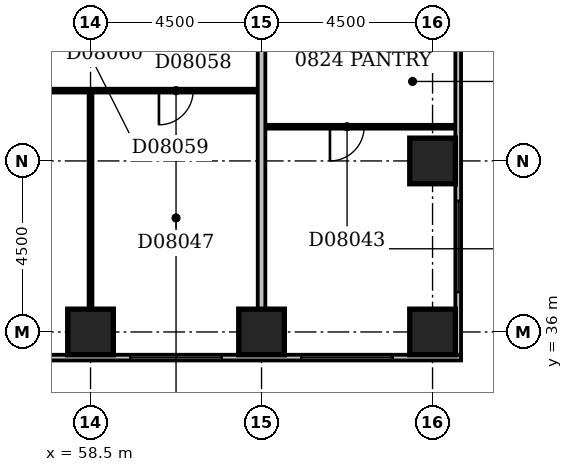
"""IFC4 building model, lengths in metres.
Left out: names, types, materials, properties, quantities, classifications, styles, units other than length and angle.
Written with IfcOpenShell. Run it as: python <this file> out.ifc"""

import sys

from ifc_helpers import new_model, si_unit, direction, frame, frame_2d, origin, origin_2d, place, context, subcontext, project, spatial, rectangle, extrude, element, fill, save


model = new_model("IFC4")
c1 = context("Model", 3, precision=1e-05, world=origin(), true_north=direction((0.0, 1.0)))
c2 = subcontext(c1, "Body", "Model", "MODEL_VIEW")
j1 = project(units=[si_unit("LENGTHUNIT", "METRE"), si_unit("PLANEANGLEUNIT", "RADIAN")], contexts=[c1])
p1 = place(None, origin())
s1 = spatial("IfcSite", under=j1, at=p1, CompositionType="ELEMENT")
p2 = place(p1, origin())
s2 = spatial("IfcBuilding", under=s1, at=p2, CompositionType="ELEMENT")
p3 = place(p2, frame((0.0, 0.0, 39.8)))
s3 = spatial("IfcBuildingStorey", under=s2, at=p3, CompositionType="ELEMENT", Elevation=39.8)
for number, where, z_axis, x_axis in (
    (1, (58.5, 36.0, -0.3), (0.0, 0.0, 1.0), (1.0, 0.0, 0.0)),
    (2, (63.0, 36.0, -0.3), (0.0, 0.0, 1.0), (1.0, 0.0, 0.0)),
    (3, (67.5, 36.0, -0.3), (0.0, 0.0, 1.0), (1.0, 0.0, 0.0)),
    (4, (67.5, 40.5, -0.3), (0.0, 0.0, 1.0), (1.0, 0.0, 0.0)),
):
    element("IfcColumn", number, at=place(p3, frame(where, z_axis=z_axis, x_axis=x_axis)), inside=s3, PredefinedType="COLUMN", context=c2, shape_type="SweptSolid", body=[
        extrude(rectangle(XDim=1.2, YDim=1.2, at=origin_2d()), origin(), (0.0, 0.0, 1.0), 3.6),
    ])
p4 = place(p3, frame((23.1, 35.325, 0.0), z_axis=(0.0, 0.0, 1.0), x_axis=(1.0, 0.0, 0.0)))
e5 = element("IfcWall", 5, at=p4, inside=s3, PredefinedType="STANDARD", context=c2, shape_type="SweptSolid", body=[
    extrude(rectangle(XDim=45.15, YDim=0.15, at=frame_2d((22.575, 0.0))), origin(), (0.0, 0.0, 1.0), 2.7),
])
p5 = place(p4, frame((0.45, 0.0, 0.6)))
e6 = element("IfcOpeningElement", 6, at=p5, cuts=e5, PredefinedType="OPENING", context=c2, shape_type="SweptSolid", body=[
    extrude(rectangle(XDim=2.4, YDim=1.8, at=frame_2d((1.2, 0.9))), frame((0.0, 0.087, 0.0), z_axis=(0.0, -1.0, 0.0), x_axis=(1.0, 0.0, 0.0)), (0.0, 0.0, 1.0), 0.174),
])
p6 = place(p4, frame((6.56, 0.0, 0.6)))
e7 = element("IfcOpeningElement", 7, at=p6, cuts=e5, PredefinedType="OPENING", context=c2, shape_type="SweptSolid", body=[
    extrude(rectangle(XDim=0.9, YDim=1.8, at=frame_2d((0.45, 0.9))), frame((0.0, 0.087, 0.0), z_axis=(0.0, -1.0, 0.0), x_axis=(1.0, 0.0, 0.0)), (0.0, 0.0, 1.0), 0.174),
])
p7 = place(p4, frame((9.45, 0.0, 0.6)))
e8 = element("IfcOpeningElement", 8, at=p7, cuts=e5, PredefinedType="OPENING", context=c2, shape_type="SweptSolid", body=[
    extrude(rectangle(XDim=2.4, YDim=1.8, at=frame_2d((1.2, 0.9))), frame((0.0, 0.087, 0.0), z_axis=(0.0, -1.0, 0.0), x_axis=(1.0, 0.0, 0.0)), (0.0, 0.0, 1.0), 0.174),
])
p8 = place(p4, frame((13.95, 0.0, 0.6)))
e9 = element("IfcOpeningElement", 9, at=p8, cuts=e5, PredefinedType="OPENING", context=c2, shape_type="SweptSolid", body=[
    extrude(rectangle(XDim=2.4, YDim=1.8, at=frame_2d((1.2, 0.9))), frame((0.0, 0.087, 0.0), z_axis=(0.0, -1.0, 0.0), x_axis=(1.0, 0.0, 0.0)), (0.0, 0.0, 1.0), 0.174),
])
p9 = place(p4, frame((18.33, 0.0, 0.6)))
e10 = element("IfcOpeningElement", 10, at=p9, cuts=e5, PredefinedType="OPENING", context=c2, shape_type="SweptSolid", body=[
    extrude(rectangle(XDim=1.5, YDim=1.8, at=frame_2d((0.75, 0.9))), frame((0.0, 0.087, 0.0), z_axis=(0.0, -1.0, 0.0), x_axis=(1.0, 0.0, 0.0)), (0.0, 0.0, 1.0), 0.174),
])
p10 = place(p4, frame((22.95, 0.0, 0.6)))
e11 = element("IfcOpeningElement", 11, at=p10, cuts=e5, PredefinedType="OPENING", context=c2, shape_type="SweptSolid", body=[
    extrude(rectangle(XDim=2.4, YDim=1.8, at=frame_2d((1.2, 0.9))), frame((0.0, 0.087, 0.0), z_axis=(0.0, -1.0, 0.0), x_axis=(1.0, 0.0, 0.0)), (0.0, 0.0, 1.0), 0.174),
])
p11 = place(p4, frame((27.45, 0.0, 0.6)))
e12 = element("IfcOpeningElement", 12, at=p11, cuts=e5, PredefinedType="OPENING", context=c2, shape_type="SweptSolid", body=[
    extrude(rectangle(XDim=2.4, YDim=1.8, at=frame_2d((1.2, 0.9))), frame((0.0, 0.087, 0.0), z_axis=(0.0, -1.0, 0.0), x_axis=(1.0, 0.0, 0.0)), (0.0, 0.0, 1.0), 0.174),
])
p12 = place(p4, frame((31.797, 0.0, 0.6)))
e13 = element("IfcOpeningElement", 13, at=p12, cuts=e5, PredefinedType="OPENING", context=c2, shape_type="SweptSolid", body=[
    extrude(rectangle(XDim=0.6, YDim=1.8, at=frame_2d((0.3, 0.9))), frame((0.0, 0.087, 0.0), z_axis=(0.0, -1.0, 0.0), x_axis=(1.0, 0.0, 0.0)), (0.0, 0.0, 1.0), 0.174),
])
p13 = place(p4, frame((36.45, 0.0, 0.6)))
e14 = element("IfcOpeningElement", 14, at=p13, cuts=e5, PredefinedType="OPENING", context=c2, shape_type="SweptSolid", body=[
    extrude(rectangle(XDim=2.4, YDim=1.8, at=frame_2d((1.2, 0.9))), frame((0.0, 0.087, 0.0), z_axis=(0.0, -1.0, 0.0), x_axis=(1.0, 0.0, 0.0)), (0.0, 0.0, 1.0), 0.174),
])
p14 = place(p4, frame((40.95, 0.0, 0.6)))
e15 = element("IfcOpeningElement", 15, at=p14, cuts=e5, PredefinedType="OPENING", context=c2, shape_type="SweptSolid", body=[
    extrude(rectangle(XDim=2.4, YDim=1.8, at=frame_2d((1.2, 0.9))), frame((0.0, 0.087, 0.0), z_axis=(0.0, -1.0, 0.0), x_axis=(1.0, 0.0, 0.0)), (0.0, 0.0, 1.0), 0.174),
])
p15 = place(p3, frame((68.175, 35.4, 0.0), z_axis=(0.0, 0.0, 1.0), x_axis=(0.0, 1.0, 0.0)))
e16 = element("IfcWall", 16, at=p15, inside=s3, PredefinedType="STANDARD", context=c2, shape_type="SweptSolid", body=[
    extrude(rectangle(XDim=23.85, YDim=0.15, at=frame_2d((11.925, 0.0))), origin(), (0.0, 0.0, 1.0), 2.7),
])
p16 = place(p15, frame((1.65, 0.0, 0.6)))
e17 = element("IfcOpeningElement", 17, at=p16, cuts=e16, PredefinedType="OPENING", context=c2, shape_type="SweptSolid", body=[
    extrude(rectangle(XDim=2.4, YDim=1.8, at=frame_2d((1.2, 0.9))), frame((0.0, 0.087, 0.0), z_axis=(0.0, -1.0, 0.0), x_axis=(1.0, 0.0, 0.0)), (0.0, 0.0, 1.0), 0.174),
])
p17 = place(p15, frame((20.355, 0.0, 0.6)))
e18 = element("IfcOpeningElement", 18, at=p17, cuts=e16, PredefinedType="OPENING", context=c2, shape_type="SweptSolid", body=[
    extrude(rectangle(XDim=1.8, YDim=1.8, at=frame_2d((0.9, 0.9))), frame((0.0, 0.087, 0.0), z_axis=(0.0, -1.0, 0.0), x_axis=(1.0, 0.0, 0.0)), (0.0, 0.0, 1.0), 0.174),
])
p18 = place(p3, frame((58.5, 36.6, 0.0), z_axis=(0.0, 0.0, 1.0), x_axis=(0.0, 1.0, 0.0)))
e19 = element("IfcWall", 19, at=p18, inside=s3, PredefinedType="PARTITIONING", context=c2, shape_type="SweptSolid", body=[
    extrude(rectangle(XDim=5.7, YDim=0.1, at=frame_2d((2.85, 0.0))), origin(), (0.0, 0.0, 1.0), 3.3),
])
p19 = place(p3, frame((63.0, 36.6, 0.0), z_axis=(0.0, 0.0, 1.0), x_axis=(0.0, 1.0, 0.0)))
e20 = element("IfcWall", 20, at=p19, inside=s3, PredefinedType="PARTITIONING", context=c2, shape_type="SweptSolid", body=[
    extrude(rectangle(XDim=12.8, YDim=0.2, at=frame_2d((6.4, 0.0))), origin(), (0.0, 0.0, 1.0), 2.4),
])
p20 = place(p3, frame((63.1, 41.4, 0.0), z_axis=(0.0, 0.0, 1.0), x_axis=(1.0, 0.0, 0.0)))
e21 = element("IfcWall", 21, at=p20, inside=s3, PredefinedType="PARTITIONING", context=c2, shape_type="SweptSolid", body=[
    extrude(rectangle(XDim=5.0, YDim=0.1, at=frame_2d((2.5, 0.0))), origin(), (0.0, 0.0, 1.0), 3.3),
])
p21 = place(p20, frame((1.7, 0.0, 0.0)))
e22 = element("IfcOpeningElement", 22, at=p21, cuts=e21, PredefinedType="OPENING", context=c2, shape_type="SweptSolid", body=[
    extrude(rectangle(XDim=0.9, YDim=2.1, at=frame_2d((0.45, 1.05))), frame((0.0, 0.062, 0.0), z_axis=(0.0, -1.0, 0.0), x_axis=(1.0, 0.0, 0.0)), (0.0, 0.0, 1.0), 0.124),
])
p22 = place(p3, frame((45.1, 42.35, 0.0), z_axis=(0.0, 0.0, 1.0), x_axis=(1.0, 0.0, 0.0)))
e23 = element("IfcWall", 23, at=p22, inside=s3, PredefinedType="PARTITIONING", context=c2, shape_type="SweptSolid", body=[
    extrude(rectangle(XDim=17.8, YDim=0.1, at=frame_2d((8.9, 0.0))), origin(), (0.0, 0.0, 1.0), 3.3),
])
p23 = place(p22, frame((1.7, 0.0, 0.0)))
e24 = element("IfcOpeningElement", 24, at=p23, cuts=e23, PredefinedType="OPENING", context=c2, shape_type="SweptSolid", body=[
    extrude(rectangle(XDim=0.9, YDim=2.1, at=frame_2d((0.45, 1.05))), frame((0.0, 0.062, 0.0), z_axis=(0.0, -1.0, 0.0), x_axis=(1.0, 0.0, 0.0)), (0.0, 0.0, 1.0), 0.124),
])
p24 = place(p22, frame((6.2, 0.0, 0.0)))
e25 = element("IfcOpeningElement", 25, at=p24, cuts=e23, PredefinedType="OPENING", context=c2, shape_type="SweptSolid", body=[
    extrude(rectangle(XDim=0.9, YDim=2.1, at=frame_2d((0.45, 1.05))), frame((0.0, 0.062, 0.0), z_axis=(0.0, -1.0, 0.0), x_axis=(1.0, 0.0, 0.0)), (0.0, 0.0, 1.0), 0.124),
])
p25 = place(p22, frame((10.7, 0.0, 0.0)))
e26 = element("IfcOpeningElement", 26, at=p25, cuts=e23, PredefinedType="OPENING", context=c2, shape_type="SweptSolid", body=[
    extrude(rectangle(XDim=0.9, YDim=2.1, at=frame_2d((0.45, 1.05))), frame((0.0, 0.062, 0.0), z_axis=(0.0, -1.0, 0.0), x_axis=(1.0, 0.0, 0.0)), (0.0, 0.0, 1.0), 0.124),
])
p26 = place(p22, frame((15.2, 0.0, 0.0)))
e27 = element("IfcOpeningElement", 27, at=p26, cuts=e23, PredefinedType="OPENING", context=c2, shape_type="SweptSolid", body=[
    extrude(rectangle(XDim=0.9, YDim=2.1, at=frame_2d((0.45, 1.05))), frame((0.0, 0.062, 0.0), z_axis=(0.0, -1.0, 0.0), x_axis=(1.0, 0.0, 0.0)), (0.0, 0.0, 1.0), 0.124),
])
p27 = place(p13, origin())
e28 = element("IfcWindow", 28, at=p27, inside=s3, PartitioningType="SINGLE_PANEL", PredefinedType="WINDOW", context=c2, shape_type="SweptSolid", body=[
    extrude(rectangle(XDim=2.4, YDim=1.8, at=frame_2d((1.2, 0.9))), frame((0.0, 0.03, 0.0), z_axis=(0.0, -1.0, 0.0), x_axis=(1.0, 0.0, 0.0)), (0.0, 0.0, 1.0), 0.06),
])
fill(e14, e28)
p28 = place(p14, origin())
e29 = element("IfcWindow", 29, at=p28, inside=s3, PartitioningType="SINGLE_PANEL", PredefinedType="WINDOW", context=c2, shape_type="SweptSolid", body=[
    extrude(rectangle(XDim=2.4, YDim=1.8, at=frame_2d((1.2, 0.9))), frame((0.0, 0.03, 0.0), z_axis=(0.0, -1.0, 0.0), x_axis=(1.0, 0.0, 0.0)), (0.0, 0.0, 1.0), 0.06),
])
fill(e15, e29)
p29 = place(p16, origin())
e30 = element("IfcWindow", 30, at=p29, inside=s3, PartitioningType="SINGLE_PANEL", PredefinedType="WINDOW", context=c2, shape_type="SweptSolid", body=[
    extrude(rectangle(XDim=2.4, YDim=1.8, at=frame_2d((1.2, 0.9))), frame((0.0, 0.03, 0.0), z_axis=(0.0, -1.0, 0.0), x_axis=(1.0, 0.0, 0.0)), (0.0, 0.0, 1.0), 0.06),
])
fill(e17, e30)
p30 = place(p21, frame((0.9, 0.0, 0.0), z_axis=(0.0, 0.0, 1.0), x_axis=(-1.0, 0.0, 0.0)))
e31 = element("IfcDoor", 31, at=p30, inside=s3, OperationType="SINGLE_SWING_RIGHT", PredefinedType="DOOR", context=c2, shape_type="SweptSolid", body=[
    extrude(rectangle(XDim=0.9, YDim=2.1, at=frame_2d((0.45, 1.05))), frame((0.0, 0.025, 0.0), z_axis=(0.0, -1.0, 0.0), x_axis=(1.0, 0.0, 0.0)), (0.0, 0.0, 1.0), 0.05),
])
fill(e22, e31)
p31 = place(p26, frame((0.9, 0.0, 0.0), z_axis=(0.0, 0.0, 1.0), x_axis=(-1.0, 0.0, 0.0)))
e32 = element("IfcDoor", 32, at=p31, inside=s3, OperationType="SINGLE_SWING_RIGHT", PredefinedType="DOOR", context=c2, shape_type="SweptSolid", body=[
    extrude(rectangle(XDim=0.9, YDim=2.1, at=frame_2d((0.45, 1.05))), frame((0.0, 0.025, 0.0), z_axis=(0.0, -1.0, 0.0), x_axis=(1.0, 0.0, 0.0)), (0.0, 0.0, 1.0), 0.05),
])
fill(e27, e32)
save(model, sys.argv[1])
